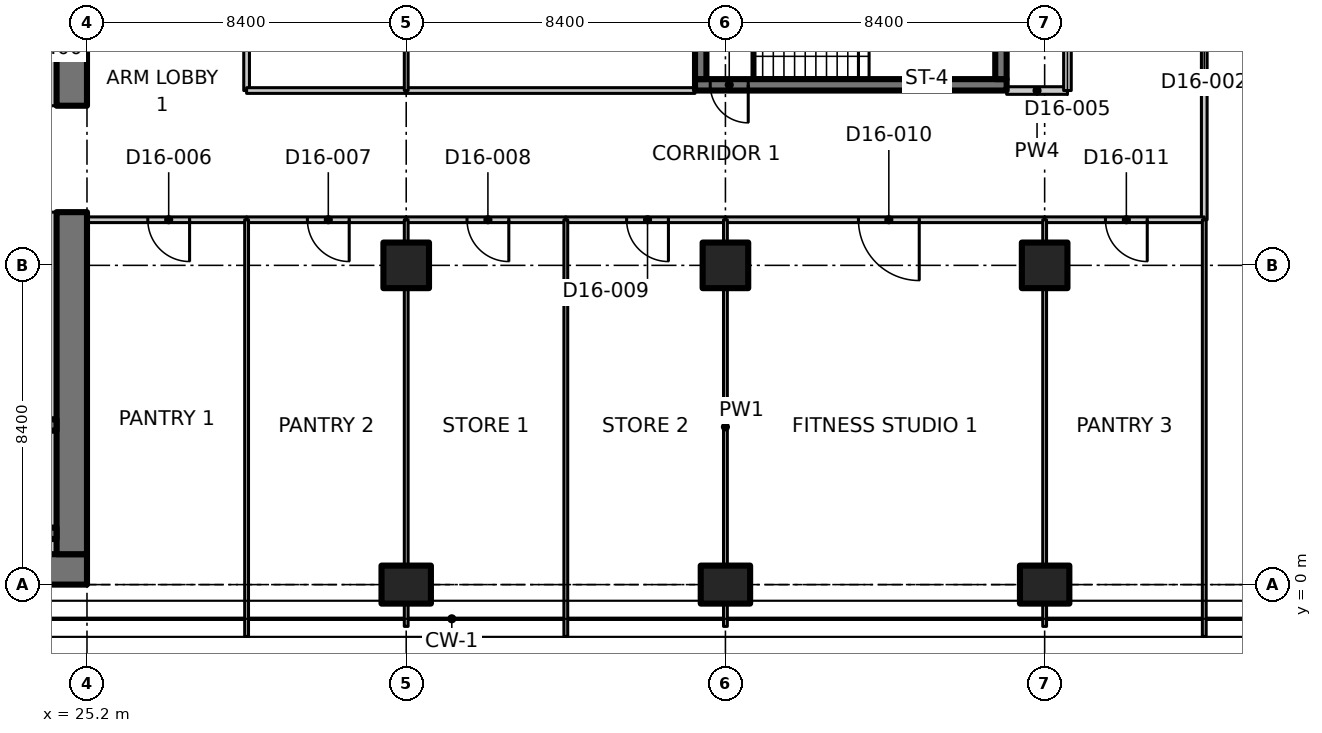
"""IFC4 building model, lengths in metres.
Left out: names, types, materials, properties, quantities, classifications, styles, units other than length and angle.
Written with IfcOpenShell. Run it as: python <this file> out.ifc"""

import sys

from ifc_helpers import new_model, si_unit, direction, frame, frame_2d, origin, origin_2d, place, context, subcontext, project, spatial, polyline, rectangle, outline, extrude, element, fill, save


model = new_model("IFC4")
c1 = context("Model", 3, precision=1e-05, world=origin(), true_north=direction((0.0, 1.0)))
c2 = subcontext(c1, "Body", "Model", "MODEL_VIEW")
j1 = project(units=[si_unit("LENGTHUNIT", "METRE"), si_unit("PLANEANGLEUNIT", "RADIAN")], contexts=[c1])
p1 = place(None, origin())
s1 = spatial("IfcSite", under=j1, at=p1, CompositionType="ELEMENT")
p2 = place(p1, origin())
s2 = spatial("IfcBuilding", under=s1, at=p2, CompositionType="ELEMENT")
p3 = place(p2, frame((0.0, 0.0, 124.1)))
s3 = spatial("IfcBuildingStorey", under=s2, at=p3, CompositionType="ELEMENT", Elevation=124.1)
p4 = place(p3, frame((33.6, 0.0, 0.0), z_axis=(0.0, 0.0, 1.0), x_axis=(0.0, 1.0, 0.0)))
e1 = element("IfcColumn", 1, at=p4, inside=s3, PredefinedType="COLUMN", context=c2, shape_type="SweptSolid", body=[
    extrude(rectangle(XDim=1.0, YDim=1.3, at=origin_2d()), origin(), (0.0, 0.0, 1.0), 3.35),
])
p5 = place(p3, frame((33.6, 8.4, 0.0), z_axis=(0.0, 0.0, 1.0), x_axis=(1.0, 0.0, 0.0)))
e2 = element("IfcColumn", 2, at=p5, inside=s3, PredefinedType="COLUMN", context=c2, shape_type="SweptSolid", body=[
    extrude(rectangle(XDim=1.2, YDim=1.2, at=origin_2d()), origin(), (0.0, 0.0, 1.0), 3.35),
])
p6 = place(p3, frame((42.0, 0.0, 0.0), z_axis=(0.0, 0.0, 1.0), x_axis=(0.0, 1.0, 0.0)))
e3 = element("IfcColumn", 3, at=p6, inside=s3, PredefinedType="COLUMN", context=c2, shape_type="SweptSolid", body=[
    extrude(rectangle(XDim=1.0, YDim=1.3, at=origin_2d()), origin(), (0.0, 0.0, 1.0), 3.35),
])
p7 = place(p3, frame((42.0, 8.4, 0.0), z_axis=(0.0, 0.0, 1.0), x_axis=(1.0, 0.0, 0.0)))
e4 = element("IfcColumn", 4, at=p7, inside=s3, PredefinedType="COLUMN", context=c2, shape_type="SweptSolid", body=[
    extrude(rectangle(XDim=1.2, YDim=1.2, at=origin_2d()), origin(), (0.0, 0.0, 1.0), 3.35),
])
p8 = place(p3, frame((50.4, 0.0, 0.0), z_axis=(0.0, 0.0, 1.0), x_axis=(0.0, 1.0, 0.0)))
e5 = element("IfcColumn", 5, at=p8, inside=s3, PredefinedType="COLUMN", context=c2, shape_type="SweptSolid", body=[
    extrude(rectangle(XDim=1.0, YDim=1.3, at=origin_2d()), origin(), (0.0, 0.0, 1.0), 3.35),
])
p9 = place(p3, frame((50.4, 8.4, 0.0), z_axis=(0.0, 0.0, 1.0), x_axis=(1.0, 0.0, 0.0)))
e6 = element("IfcColumn", 6, at=p9, inside=s3, PredefinedType="COLUMN", context=c2, shape_type="SweptSolid", body=[
    extrude(rectangle(XDim=1.2, YDim=1.2, at=origin_2d()), origin(), (0.0, 0.0, 1.0), 3.35),
])
p10 = place(p3, frame((7.136, 0.4, 0.0), z_axis=(0.0, 0.0, 1.0), x_axis=(1.0, 0.0, 0.0)))
e7 = element("IfcWall", 7, at=p10, inside=s3, PredefinedType="SHEAR", context=c2, shape_type="SweptSolid", body=[
    extrude(rectangle(XDim=18.063, YDim=0.8, at=frame_2d((9.032, 0.0))), origin(), (0.0, 0.0, 1.0), 3.35),
])
p11 = place(p3, frame((24.8, 0.8, 0.0), z_axis=(0.0, 0.0, 1.0), x_axis=(0.0, 1.0, 0.0)))
e8 = element("IfcWall", 8, at=p11, inside=s3, PredefinedType="SHEAR", context=c2, shape_type="SweptSolid", body=[
    extrude(rectangle(XDim=9.0, YDim=0.8, at=frame_2d((4.5, 0.0))), origin(), (0.0, 0.0, 1.0), 3.35),
])
p12 = place(p3, frame((24.8, 12.6, 0.0), z_axis=(0.0, 0.0, 1.0), x_axis=(0.0, 1.0, 0.0)))
e9 = element("IfcWall", 9, at=p12, inside=s3, PredefinedType="SHEAR", context=c2, shape_type="SweptSolid", body=[
    extrude(rectangle(XDim=3.4, YDim=0.8, at=frame_2d((1.7, 0.0))), origin(), (0.0, 0.0, 1.0), 3.35),
])
p13 = place(p3, frame((24.2, 12.6, 0.0), z_axis=(0.0, 0.0, 1.0), x_axis=(0.0, 1.0, 0.0)))
e10 = element("IfcWall", 10, at=p13, inside=s3, PredefinedType="PARTITIONING", context=c2, shape_type="SweptSolid", body=[
    extrude(rectangle(XDim=3.0, YDim=0.4, at=frame_2d((1.5, 0.0))), origin(), (0.0, 0.0, 1.0), 3.35),
])
p14 = place(p3, frame((15.8, 1.35, 0.0), z_axis=(0.0, 0.0, 1.0), x_axis=(1.0, 0.0, 0.0)))
e11 = element("IfcWall", 11, at=p14, inside=s3, PredefinedType="SHEAR", context=c2, shape_type="SweptSolid", body=[
    extrude(rectangle(XDim=8.6, YDim=0.3, at=frame_2d((4.3, 0.0))), origin(), (0.0, 0.0, 1.0), 3.35),
])
p15 = place(p3, frame((15.8, 4.2, 0.0), z_axis=(0.0, 0.0, 1.0), x_axis=(1.0, 0.0, 0.0)))
e12 = element("IfcWall", 12, at=p15, inside=s3, PredefinedType="SHEAR", context=c2, shape_type="SweptSolid", body=[
    extrude(rectangle(XDim=8.6, YDim=0.3, at=frame_2d((4.3, 0.0))), origin(), (0.0, 0.0, 1.0), 3.35),
])
p16 = place(p15, frame((0.4, 0.0, 0.0)))
e13 = element("IfcOpeningElement", 13, at=p16, cuts=e12, PredefinedType="OPENING", context=c2, shape_type="SweptSolid", body=[
    extrude(rectangle(XDim=1.0, YDim=2.1, at=frame_2d((0.5, 1.05))), frame((0.0, 0.16, 0.0), z_axis=(0.0, -1.0, 0.0), x_axis=(1.0, 0.0, 0.0)), (0.0, 0.0, 1.0), 0.32),
])
p17 = place(p3, frame((49.4, 13.15, 0.0), z_axis=(0.0, 0.0, 1.0), x_axis=(-1.0, 0.0, 0.0)))
e14 = element("IfcWall", 14, at=p17, inside=s3, PredefinedType="SHEAR", context=c2, shape_type="SweptSolid", body=[
    extrude(rectangle(XDim=8.2, YDim=0.3, at=frame_2d((4.1, 0.0))), origin(), (0.0, 0.0, 1.0), 3.35),
])
p18 = place(p17, frame((6.8, 0.0, 0.0)))
e15 = element("IfcOpeningElement", 15, at=p18, cuts=e14, PredefinedType="OPENING", context=c2, shape_type="SweptSolid", body=[
    extrude(rectangle(XDim=1.0, YDim=2.1, at=frame_2d((0.5, 1.05))), frame((0.0, 0.16, 0.0), z_axis=(0.0, -1.0, 0.0), x_axis=(1.0, 0.0, 0.0)), (0.0, 0.0, 1.0), 0.32),
])
for number, where, z_axis, x_axis in (
    (16, (41.35, 13.3, 0.0), (0.0, 0.0, 1.0), (0.0, 1.0, 0.0)),
    (17, (49.25, 13.3, 0.0), (0.0, 0.0, 1.0), (0.0, 1.0, 0.0)),
):
    element("IfcWall", number, at=place(p3, frame(where, z_axis=z_axis, x_axis=x_axis)), inside=s3, PredefinedType="SHEAR", context=c2, shape_type="SweptSolid", body=[
        extrude(rectangle(XDim=2.55, YDim=0.3, at=frame_2d((1.275, 0.0))), origin(), (0.0, 0.0, 1.0), 3.35),
    ])
p19 = place(p3, frame((13.35, 1.0, 0.0), z_axis=(0.0, 0.0, 1.0), x_axis=(1.0, 0.0, 0.0)))
e18 = element("IfcWall", 18, at=p19, inside=s3, PredefinedType="PARTITIONING", context=c2, shape_type="SweptSolid", body=[
    extrude(rectangle(XDim=11.05, YDim=0.4, at=frame_2d((5.525, 0.0))), origin(), (0.0, 0.0, 1.0), 3.35),
])
p20 = place(p3, frame((24.2, 1.5, 0.0), z_axis=(0.0, 0.0, 1.0), x_axis=(0.0, 1.0, 0.0)))
e19 = element("IfcWall", 19, at=p20, inside=s3, PredefinedType="PARTITIONING", context=c2, shape_type="SweptSolid", body=[
    extrude(rectangle(XDim=2.55, YDim=0.4, at=frame_2d((1.275, 0.0))), origin(), (0.0, 0.0, 1.0), 3.35),
])
p21 = place(p3, frame((24.2, 4.35, 0.0), z_axis=(0.0, 0.0, 1.0), x_axis=(0.0, 1.0, 0.0)))
e20 = element("IfcWall", 20, at=p21, inside=s3, PredefinedType="PARTITIONING", context=c2, shape_type="SweptSolid", body=[
    extrude(rectangle(XDim=5.45, YDim=0.4, at=frame_2d((2.725, 0.0))), origin(), (0.0, 0.0, 1.0), 3.35),
])
p22 = place(p3, frame((29.4, 17.6, 0.0), z_axis=(0.0, 0.0, 1.0), x_axis=(0.0, -1.0, 0.0)))
e21 = element("IfcWall", 21, at=p22, inside=s3, PredefinedType="PARTITIONING", context=c2, shape_type="SweptSolid", body=[
    extrude(rectangle(XDim=4.6, YDim=0.15, at=frame_2d((2.3, 0.0))), origin(), (0.0, 0.0, 1.0), 3.33),
])
p23 = place(p22, frame((1.8, 0.0, 0.0)))
e22 = element("IfcOpeningElement", 22, at=p23, cuts=e21, PredefinedType="OPENING", context=c2, shape_type="SweptSolid", body=[
    extrude(rectangle(XDim=1.0, YDim=2.1, at=frame_2d((0.5, 1.05))), frame((0.0, 0.085, 0.0), z_axis=(0.0, -1.0, 0.0), x_axis=(1.0, 0.0, 0.0)), (0.0, 0.0, 1.0), 0.17),
])
p24 = place(p3, frame((29.4, 9.6, 0.0), z_axis=(0.0, 0.0, 1.0), x_axis=(-1.0, 0.0, 0.0)))
e23 = element("IfcWall", 23, at=p24, inside=s3, PredefinedType="PARTITIONING", context=c2, shape_type="SweptSolid", body=[
    extrude(rectangle(XDim=4.2, YDim=0.15, at=frame_2d((2.1, 0.0))), origin(), (0.0, 0.0, 1.0), 3.33),
])
p25 = place(p24, frame((1.5, 0.0, 0.0)))
e24 = element("IfcOpeningElement", 24, at=p25, cuts=e23, PredefinedType="OPENING", context=c2, shape_type="SweptSolid", body=[
    extrude(rectangle(XDim=1.1, YDim=2.1, at=frame_2d((0.55, 1.05))), frame((0.0, 0.085, 0.0), z_axis=(0.0, -1.0, 0.0), x_axis=(1.0, 0.0, 0.0)), (0.0, 0.0, 1.0), 0.17),
])
p26 = place(p3, frame((54.6, 13.0, 0.0), z_axis=(0.0, 0.0, 1.0), x_axis=(0.0, -1.0, 0.0)))
e25 = element("IfcWall", 25, at=p26, inside=s3, PredefinedType="PARTITIONING", context=c2, shape_type="SweptSolid", body=[
    extrude(rectangle(XDim=3.4, YDim=0.15, at=frame_2d((1.7, 0.0))), origin(), (0.0, 0.0, 1.0), 3.33),
])
p27 = place(p3, frame((29.4, 13.0, 0.0), z_axis=(0.0, 0.0, 1.0), x_axis=(1.0, 0.0, 0.0)))
e26 = element("IfcWall", 26, at=p27, inside=s3, PredefinedType="PARTITIONING", context=c2, shape_type="SweptSolid", body=[
    extrude(rectangle(XDim=4.2, YDim=0.15, at=frame_2d((2.1, 0.0))), origin(), (0.0, 0.0, 1.0), 3.33),
])
p28 = place(p3, frame((33.6, 13.0, 0.0), z_axis=(0.0, 0.0, 1.0), x_axis=(1.0, 0.0, 0.0)))
e27 = element("IfcWall", 27, at=p28, inside=s3, PredefinedType="PARTITIONING", context=c2, shape_type="SweptSolid", body=[
    extrude(rectangle(XDim=7.6, YDim=0.15, at=frame_2d((3.8, 0.0))), origin(), (0.0, 0.0, 1.0), 3.33),
])
p29 = place(p3, frame((49.4, 13.0, 0.0), z_axis=(0.0, 0.0, 1.0), x_axis=(1.0, 0.0, 0.0)))
e28 = element("IfcWall", 28, at=p29, inside=s3, PredefinedType="PARTITIONING", context=c2, shape_type="SweptSolid", body=[
    extrude(rectangle(XDim=1.6, YDim=0.2, at=frame_2d((0.8, 0.0))), origin(), (0.0, 0.0, 1.0), 3.33),
])
p30 = place(p3, frame((33.6, 9.6, 0.0), z_axis=(0.0, 0.0, 1.0), x_axis=(-1.0, 0.0, 0.0)))
e29 = element("IfcWall", 29, at=p30, inside=s3, PredefinedType="PARTITIONING", context=c2, shape_type="SweptSolid", body=[
    extrude(rectangle(XDim=4.2, YDim=0.15, at=frame_2d((2.1, 0.0))), origin(), (0.0, 0.0, 1.0), 3.33),
])
p31 = place(p30, frame((1.5, 0.0, 0.0)))
e30 = element("IfcOpeningElement", 30, at=p31, cuts=e29, PredefinedType="OPENING", context=c2, shape_type="SweptSolid", body=[
    extrude(rectangle(XDim=1.1, YDim=2.1, at=frame_2d((0.55, 1.05))), frame((0.0, 0.085, 0.0), z_axis=(0.0, -1.0, 0.0), x_axis=(1.0, 0.0, 0.0)), (0.0, 0.0, 1.0), 0.17),
])
p32 = place(p3, frame((37.8, 9.6, 0.0), z_axis=(0.0, 0.0, 1.0), x_axis=(-1.0, 0.0, 0.0)))
e31 = element("IfcWall", 31, at=p32, inside=s3, PredefinedType="PARTITIONING", context=c2, shape_type="SweptSolid", body=[
    extrude(rectangle(XDim=4.2, YDim=0.15, at=frame_2d((2.1, 0.0))), origin(), (0.0, 0.0, 1.0), 3.33),
])
p33 = place(p32, frame((1.5, 0.0, 0.0)))
e32 = element("IfcOpeningElement", 32, at=p33, cuts=e31, PredefinedType="OPENING", context=c2, shape_type="SweptSolid", body=[
    extrude(rectangle(XDim=1.1, YDim=2.1, at=frame_2d((0.55, 1.05))), frame((0.0, 0.085, 0.0), z_axis=(0.0, -1.0, 0.0), x_axis=(1.0, 0.0, 0.0)), (0.0, 0.0, 1.0), 0.17),
])
p34 = place(p3, frame((42.0, 9.6, 0.0), z_axis=(0.0, 0.0, 1.0), x_axis=(-1.0, 0.0, 0.0)))
e33 = element("IfcWall", 33, at=p34, inside=s3, PredefinedType="PARTITIONING", context=c2, shape_type="SweptSolid", body=[
    extrude(rectangle(XDim=4.2, YDim=0.15, at=frame_2d((2.1, 0.0))), origin(), (0.0, 0.0, 1.0), 3.33),
])
p35 = place(p34, frame((1.5, 0.0, 0.0)))
e34 = element("IfcOpeningElement", 34, at=p35, cuts=e33, PredefinedType="OPENING", context=c2, shape_type="SweptSolid", body=[
    extrude(rectangle(XDim=1.1, YDim=2.1, at=frame_2d((0.55, 1.05))), frame((0.0, 0.085, 0.0), z_axis=(0.0, -1.0, 0.0), x_axis=(1.0, 0.0, 0.0)), (0.0, 0.0, 1.0), 0.17),
])
p36 = place(p3, frame((50.4, 9.6, 0.0), z_axis=(0.0, 0.0, 1.0), x_axis=(-1.0, 0.0, 0.0)))
e35 = element("IfcWall", 35, at=p36, inside=s3, PredefinedType="PARTITIONING", context=c2, shape_type="SweptSolid", body=[
    extrude(rectangle(XDim=8.4, YDim=0.15, at=frame_2d((4.2, 0.0))), origin(), (0.0, 0.0, 1.0), 3.33),
])
p37 = place(p36, frame((3.3, 0.0, 0.0)))
e36 = element("IfcOpeningElement", 36, at=p37, cuts=e35, PredefinedType="OPENING", context=c2, shape_type="SweptSolid", body=[
    extrude(rectangle(XDim=1.6, YDim=2.1, at=frame_2d((0.8, 1.05))), frame((0.0, 0.085, 0.0), z_axis=(0.0, -1.0, 0.0), x_axis=(1.0, 0.0, 0.0)), (0.0, 0.0, 1.0), 0.17),
])
p38 = place(p3, frame((54.6, 9.6, 0.0), z_axis=(0.0, 0.0, 1.0), x_axis=(-1.0, 0.0, 0.0)))
e37 = element("IfcWall", 37, at=p38, inside=s3, PredefinedType="PARTITIONING", context=c2, shape_type="SweptSolid", body=[
    extrude(rectangle(XDim=4.2, YDim=0.15, at=frame_2d((2.1, 0.0))), origin(), (0.0, 0.0, 1.0), 3.33),
])
p39 = place(p38, frame((1.5, 0.0, 0.0)))
e38 = element("IfcOpeningElement", 38, at=p39, cuts=e37, PredefinedType="OPENING", context=c2, shape_type="SweptSolid", body=[
    extrude(rectangle(XDim=1.1, YDim=2.1, at=frame_2d((0.55, 1.05))), frame((0.0, 0.085, 0.0), z_axis=(0.0, -1.0, 0.0), x_axis=(1.0, 0.0, 0.0)), (0.0, 0.0, 1.0), 0.17),
])
p40 = place(p3, frame((54.6, 21.2, 0.0), z_axis=(0.0, 0.0, 1.0), x_axis=(0.0, -1.0, 0.0)))
e39 = element("IfcWall", 39, at=p40, inside=s3, PredefinedType="PARTITIONING", context=c2, shape_type="SweptSolid", body=[
    extrude(rectangle(XDim=8.2, YDim=0.15, at=frame_2d((4.1, 0.0))), origin(), (0.0, 0.0, 1.0), 3.33),
])
p41 = place(p40, frame((3.2, 0.0, 0.0)))
e40 = element("IfcOpeningElement", 40, at=p41, cuts=e39, PredefinedType="OPENING", context=c2, shape_type="SweptSolid", body=[
    extrude(rectangle(XDim=2.0, YDim=2.4, at=frame_2d((1.0, 1.2))), frame((0.0, 0.085, 0.0), z_axis=(0.0, -1.0, 0.0), x_axis=(1.0, 0.0, 0.0)), (0.0, 0.0, 1.0), 0.17),
])
p42 = place(p3, frame((54.6, -1.365, 0.0), z_axis=(0.0, 0.0, 1.0), x_axis=(0.0, 1.0, 0.0)))
e41 = element("IfcWall", 41, at=p42, inside=s3, PredefinedType="PARTITIONING", context=c2, shape_type="SweptSolid", body=[
    extrude(outline(polyline([(0.0, 0.0), (10.965, 0.0), (10.965, 3.33), (1.815, 3.33), (1.813, 2.98), (0.917, 2.98), (0.915, 3.33), (0.265, 3.33), (0.0, 3.33), (0.0, 0.0)])), frame((0.0, 0.05, 0.0), z_axis=(0.0, -1.0, 0.0), x_axis=(1.0, 0.0, 0.0)), (0.0, 0.0, 1.0), 0.1),
])
p43 = place(p3, frame((51.0, 13.0, 0.0), z_axis=(0.0, 0.0, 1.0), x_axis=(0.0, 1.0, 0.0)))
e42 = element("IfcWall", 42, at=p43, inside=s3, PredefinedType="PARTITIONING", context=c2, shape_type="SweptSolid", body=[
    extrude(rectangle(XDim=3.18, YDim=0.2, at=frame_2d((1.59, 0.0))), origin(), (0.0, 0.0, 1.0), 3.33),
])
p44 = place(p43, frame((1.2, 0.0, 0.0)))
e43 = element("IfcOpeningElement", 43, at=p44, cuts=e42, PredefinedType="OPENING", context=c2, shape_type="SweptSolid", body=[
    extrude(rectangle(XDim=1.0, YDim=2.1, at=frame_2d((0.5, 1.05))), frame((0.0, 0.11, 0.0), z_axis=(0.0, -1.0, 0.0), x_axis=(1.0, 0.0, 0.0)), (0.0, 0.0, 1.0), 0.22),
])
p45 = place(p3, frame((33.6, 16.18, 0.0), z_axis=(0.0, 0.0, 1.0), x_axis=(0.0, -1.0, 0.0)))
e44 = element("IfcWall", 44, at=p45, inside=s3, PredefinedType="PARTITIONING", context=c2, shape_type="SweptSolid", body=[
    extrude(rectangle(XDim=3.18, YDim=0.1, at=frame_2d((1.59, 0.0))), origin(), (0.0, 0.0, 1.0), 3.33),
])
p46 = place(p3, frame((29.4, 9.6, 0.0), z_axis=(0.0, 0.0, 1.0), x_axis=(0.0, -1.0, 0.0)))
e45 = element("IfcWall", 45, at=p46, inside=s3, PredefinedType="PARTITIONING", context=c2, shape_type="SweptSolid", body=[
    extrude(outline(polyline([(0.0, 0.0), (10.965, 0.0), (10.965, 3.33), (10.7, 3.33), (10.05, 3.33), (10.048, 2.98), (9.152, 2.98), (9.15, 3.33), (0.0, 3.33), (0.0, 0.0)])), frame((0.0, 0.05, 0.0), z_axis=(0.0, -1.0, 0.0), x_axis=(1.0, 0.0, 0.0)), (0.0, 0.0, 1.0), 0.1),
])
p47 = place(p3, frame((33.6, 9.6, 0.0), z_axis=(0.0, 0.0, 1.0), x_axis=(0.0, -1.0, 0.0)))
e46 = element("IfcWall", 46, at=p47, inside=s3, PredefinedType="PARTITIONING", context=c2, shape_type="SweptSolid", body=[
    extrude(rectangle(XDim=0.58, YDim=0.1, at=frame_2d((0.29, 0.0))), origin(), (0.0, 0.0, 1.0), 3.33),
])
p48 = place(p3, frame((33.6, 7.78, 0.0), z_axis=(0.0, 0.0, 1.0), x_axis=(0.0, -1.0, 0.0)))
e47 = element("IfcWall", 47, at=p48, inside=s3, PredefinedType="PARTITIONING", context=c2, shape_type="SweptSolid", body=[
    extrude(rectangle(XDim=7.26, YDim=0.1, at=frame_2d((3.63, 0.0))), origin(), (0.0, 0.0, 1.0), 3.33),
])
p49 = place(p3, frame((33.6, -0.52, 0.0), z_axis=(0.0, 0.0, 1.0), x_axis=(0.0, -1.0, 0.0)))
e48 = element("IfcWall", 48, at=p49, inside=s3, PredefinedType="PARTITIONING", context=c2, shape_type="SweptSolid", body=[
    extrude(rectangle(XDim=0.58, YDim=0.1, at=frame_2d((0.29, 0.0))), origin(), (0.0, 0.0, 1.0), 3.33),
])
p50 = place(p3, frame((37.8, 9.6, 0.0), z_axis=(0.0, 0.0, 1.0), x_axis=(0.0, -1.0, 0.0)))
e49 = element("IfcWall", 49, at=p50, inside=s3, PredefinedType="PARTITIONING", context=c2, shape_type="SweptSolid", body=[
    extrude(outline(polyline([(0.0, 0.0), (10.965, 0.0), (10.965, 3.33), (10.7, 3.33), (10.05, 3.33), (10.048, 2.98), (9.152, 2.98), (9.15, 3.33), (0.0, 3.33), (0.0, 0.0)])), frame((0.0, 0.05, 0.0), z_axis=(0.0, -1.0, 0.0), x_axis=(1.0, 0.0, 0.0)), (0.0, 0.0, 1.0), 0.1),
])
p51 = place(p3, frame((42.0, 9.6, 0.0), z_axis=(0.0, 0.0, 1.0), x_axis=(0.0, -1.0, 0.0)))
e50 = element("IfcWall", 50, at=p51, inside=s3, PredefinedType="PARTITIONING", context=c2, shape_type="SweptSolid", body=[
    extrude(rectangle(XDim=0.58, YDim=0.1, at=frame_2d((0.29, 0.0))), origin(), (0.0, 0.0, 1.0), 3.33),
])
p52 = place(p3, frame((42.0, 7.78, 0.0), z_axis=(0.0, 0.0, 1.0), x_axis=(0.0, -1.0, 0.0)))
e51 = element("IfcWall", 51, at=p52, inside=s3, PredefinedType="PARTITIONING", context=c2, shape_type="SweptSolid", body=[
    extrude(rectangle(XDim=7.26, YDim=0.1, at=frame_2d((3.63, 0.0))), origin(), (0.0, 0.0, 1.0), 3.33),
])
for number, where, z_axis, x_axis in (
    (52, (42.0, -0.52, 0.0), (0.0, 0.0, 1.0), (0.0, -1.0, 0.0)),
    (53, (50.4, 9.6, 0.0), (0.0, 0.0, 1.0), (0.0, -1.0, 0.0)),
):
    element("IfcWall", number, at=place(p3, frame(where, z_axis=z_axis, x_axis=x_axis)), inside=s3, PredefinedType="PARTITIONING", context=c2, shape_type="SweptSolid", body=[
        extrude(rectangle(XDim=0.58, YDim=0.1, at=frame_2d((0.29, 0.0))), origin(), (0.0, 0.0, 1.0), 3.33),
    ])
p53 = place(p3, frame((50.4, 7.78, 0.0), z_axis=(0.0, 0.0, 1.0), x_axis=(0.0, -1.0, 0.0)))
e54 = element("IfcWall", 54, at=p53, inside=s3, PredefinedType="PARTITIONING", context=c2, shape_type="SweptSolid", body=[
    extrude(rectangle(XDim=7.26, YDim=0.1, at=frame_2d((3.63, 0.0))), origin(), (0.0, 0.0, 1.0), 3.33),
])
p54 = place(p3, frame((50.4, -0.52, 0.0), z_axis=(0.0, 0.0, 1.0), x_axis=(0.0, -1.0, 0.0)))
e55 = element("IfcWall", 55, at=p54, inside=s3, PredefinedType="PARTITIONING", context=c2, shape_type="SweptSolid", body=[
    extrude(rectangle(XDim=0.58, YDim=0.1, at=frame_2d((0.29, 0.0))), origin(), (0.0, 0.0, 1.0), 3.33),
])
p55 = place(p18, origin())
e56 = element("IfcDoor", 56, at=p55, inside=s3, OperationType="SINGLE_SWING_RIGHT", PredefinedType="DOOR", context=c2, shape_type="SweptSolid", body=[
    extrude(rectangle(XDim=1.0, YDim=2.1, at=frame_2d((0.5, 1.05))), frame((0.0, 0.025, 0.0), z_axis=(0.0, -1.0, 0.0), x_axis=(1.0, 0.0, 0.0)), (0.0, 0.0, 1.0), 0.05),
])
fill(e15, e56)
p56 = place(p25, origin())
e57 = element("IfcDoor", 57, at=p56, inside=s3, OperationType="SINGLE_SWING_LEFT", PredefinedType="DOOR", context=c2, shape_type="SweptSolid", body=[
    extrude(rectangle(XDim=1.1, YDim=2.1, at=frame_2d((0.55, 1.05))), frame((0.0, 0.025, 0.0), z_axis=(0.0, -1.0, 0.0), x_axis=(1.0, 0.0, 0.0)), (0.0, 0.0, 1.0), 0.05),
])
fill(e24, e57)
p57 = place(p31, origin())
e58 = element("IfcDoor", 58, at=p57, inside=s3, OperationType="SINGLE_SWING_LEFT", PredefinedType="DOOR", context=c2, shape_type="SweptSolid", body=[
    extrude(rectangle(XDim=1.1, YDim=2.1, at=frame_2d((0.55, 1.05))), frame((0.0, 0.025, 0.0), z_axis=(0.0, -1.0, 0.0), x_axis=(1.0, 0.0, 0.0)), (0.0, 0.0, 1.0), 0.05),
])
fill(e30, e58)
p58 = place(p33, origin())
e59 = element("IfcDoor", 59, at=p58, inside=s3, OperationType="SINGLE_SWING_LEFT", PredefinedType="DOOR", context=c2, shape_type="SweptSolid", body=[
    extrude(rectangle(XDim=1.1, YDim=2.1, at=frame_2d((0.55, 1.05))), frame((0.0, 0.025, 0.0), z_axis=(0.0, -1.0, 0.0), x_axis=(1.0, 0.0, 0.0)), (0.0, 0.0, 1.0), 0.05),
])
fill(e32, e59)
p59 = place(p35, origin())
e60 = element("IfcDoor", 60, at=p59, inside=s3, OperationType="SINGLE_SWING_LEFT", PredefinedType="DOOR", context=c2, shape_type="SweptSolid", body=[
    extrude(rectangle(XDim=1.1, YDim=2.1, at=frame_2d((0.55, 1.05))), frame((0.0, 0.025, 0.0), z_axis=(0.0, -1.0, 0.0), x_axis=(1.0, 0.0, 0.0)), (0.0, 0.0, 1.0), 0.05),
])
fill(e34, e60)
p60 = place(p37, origin())
e61 = element("IfcDoor", 61, at=p60, inside=s3, OperationType="DOUBLE_DOOR_SINGLE_SWING", PredefinedType="DOOR", context=c2, shape_type="SweptSolid", body=[
    extrude(rectangle(XDim=1.6, YDim=2.1, at=frame_2d((0.8, 1.05))), frame((0.0, 0.025, 0.0), z_axis=(0.0, -1.0, 0.0), x_axis=(1.0, 0.0, 0.0)), (0.0, 0.0, 1.0), 0.05),
])
fill(e36, e61)
p61 = place(p39, origin())
e62 = element("IfcDoor", 62, at=p61, inside=s3, OperationType="SINGLE_SWING_LEFT", PredefinedType="DOOR", context=c2, shape_type="SweptSolid", body=[
    extrude(rectangle(XDim=1.1, YDim=2.1, at=frame_2d((0.55, 1.05))), frame((0.0, 0.025, 0.0), z_axis=(0.0, -1.0, 0.0), x_axis=(1.0, 0.0, 0.0)), (0.0, 0.0, 1.0), 0.05),
])
fill(e38, e62)
save(model, sys.argv[1])
